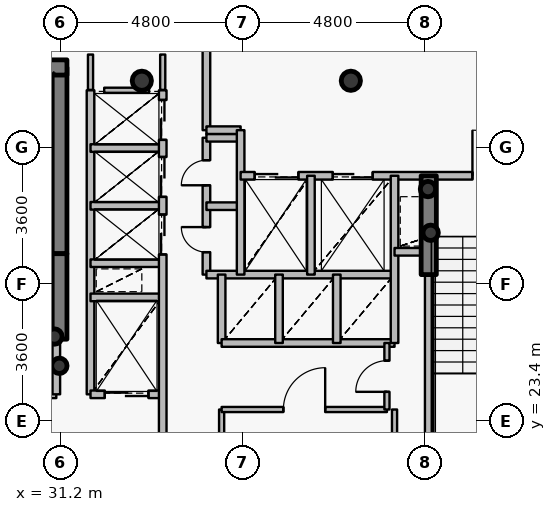
"""IFC4 building model, lengths in metres.
Left out: names, types, materials, properties, quantities, classifications, styles, units other than length and angle.
Written with IfcOpenShell. Run it as: python <this file> out.ifc"""

import sys

from ifc_helpers import new_model, si_unit, direction, frame, frame_2d, origin, origin_2d, place, context, subcontext, project, spatial, rectangle, hollow_circle, extrude, source, transform, mapped, element, fill, save


model = new_model("IFC4")
c1 = context("Model", 3, precision=1e-05, world=origin(), true_north=direction((0.0, 1.0)))
c2 = subcontext(c1, "Body", "Model", "MODEL_VIEW")
j1 = project(units=[si_unit("LENGTHUNIT", "METRE"), si_unit("PLANEANGLEUNIT", "RADIAN")], contexts=[c1])
p1 = place(None, origin())
s1 = spatial("IfcSite", under=j1, at=p1, CompositionType="ELEMENT")
p2 = place(p1, origin())
s2 = spatial("IfcBuilding", under=s1, at=p2, CompositionType="ELEMENT")
p3 = place(p2, frame((0.0, 0.0, 255.3)))
s3 = spatial("IfcBuildingStorey", under=s2, at=p3, CompositionType="ELEMENT", Elevation=255.3)
for number, where, z_axis, x_axis in (
    (1, (38.85, 32.35, 0.0), (0.0, 0.0, 1.0), (1.0, 0.0, 0.0)),
    (2, (33.35, 32.35, 0.0), (0.0, 0.0, 1.0), (1.0, 0.0, 0.0)),
):
    element("IfcColumn", number, at=place(p3, frame(where, z_axis=z_axis, x_axis=x_axis)), inside=s3, PredefinedType="COLUMN", context=c2, shape_type="SweptSolid", body=[
        extrude(hollow_circle(Radius=0.254, WallThickness=0.02, at=origin_2d()), origin(), (0.0, 0.0, 1.0), 3.75),
    ])
p4 = place(p3, frame((31.18, 27.8, 0.0), z_axis=(0.0, 0.0, 1.0), x_axis=(0.0, 1.0, 0.0)))
e3 = element("IfcWall", 3, at=p4, inside=s3, PredefinedType="SHEAR", context=c2, shape_type="SweptSolid", body=[
    extrude(rectangle(XDim=4.9, YDim=0.4, at=frame_2d((2.45, 0.0))), origin(), (0.0, 0.0, 1.0), 3.75),
])
p5 = place(p3, frame((27.28, 32.7, 0.0), z_axis=(0.0, 0.0, 1.0), x_axis=(1.0, 0.0, 0.0)))
e4 = element("IfcWall", 4, at=p5, inside=s3, PredefinedType="SHEAR", context=c2, shape_type="SweptSolid", body=[
    extrude(rectangle(XDim=4.1, YDim=0.4, at=frame_2d((2.05, 0.0))), origin(), (0.0, 0.0, 1.0), 3.75),
])
for number, where, z_axis, x_axis in (
    (5, (31.05, 25.62, 0.0), (0.0, 0.0, 1.0), (1.0, 0.0, 0.0)),
    (6, (31.18, 24.85, 0.0), (0.0, 0.0, 1.0), (1.0, 0.0, 0.0)),
    (7, (40.95, 28.35, 0.0), (0.0, 0.0, 1.0), (1.0, 0.0, 0.0)),
    (8, (40.88, 29.5, 0.0), (0.0, 0.0, 1.0), (1.0, 0.0, 0.0)),
):
    element("IfcColumn", number, at=place(p3, frame(where, z_axis=z_axis, x_axis=x_axis)), inside=s3, PredefinedType="COLUMN", context=c2, shape_type="SweptSolid", body=[
        extrude(hollow_circle(Radius=0.203, WallThickness=0.016, at=origin_2d()), origin(), (0.0, 0.0, 1.0), 3.75),
    ])
p6 = place(p3, frame((31.18, 25.55, 0.0), z_axis=(0.0, 0.0, 1.0), x_axis=(0.0, 1.0, 0.0)))
e9 = element("IfcWall", 9, at=p6, inside=s3, PredefinedType="SHEAR", context=c2, shape_type="SweptSolid", body=[
    extrude(rectangle(XDim=2.25, YDim=0.4, at=frame_2d((1.125, 0.0))), origin(), (0.0, 0.0, 1.0), 3.1),
])
p7 = place(p3, frame((40.9, 27.25, 0.0), z_axis=(0.0, 0.0, 1.0), x_axis=(0.0, 1.0, 0.0)))
e10 = element("IfcWall", 10, at=p7, inside=s3, PredefinedType="SHEAR", context=c2, shape_type="SweptSolid", body=[
    extrude(rectangle(XDim=2.6, YDim=0.4, at=frame_2d((1.3, 0.0))), origin(), (0.0, 0.0, 1.0), 3.1),
])
p8 = place(p3, frame((27.56, 24.1, 0.0), z_axis=(0.0, 0.0, 1.0), x_axis=(1.0, 0.0, 0.0)))
e11 = element("IfcWall", 11, at=p8, inside=s3, PredefinedType="PARTITIONING", context=c2, shape_type="SweptSolid", body=[
    extrude(rectangle(XDim=3.54, YDim=0.2, at=frame_2d((1.77, 0.0))), origin(), (0.0, 0.0, 1.0), 3.5),
])
p9 = place(p8, frame((1.17, 0.0, 0.0)))
e12 = element("IfcOpeningElement", 12, at=p9, cuts=e11, PredefinedType="OPENING", context=c2, shape_type="SweptSolid", body=[
    extrude(rectangle(XDim=1.2, YDim=2.15, at=origin_2d()), frame((0.6, 0.11, 1.075), z_axis=(0.0, -1.0, 0.0), x_axis=(1.0, 0.0, 0.0)), (0.0, 0.0, 1.0), 0.22),
])
p10 = place(p3, frame((31.1, 24.1, 0.0), z_axis=(0.0, 0.0, 1.0), x_axis=(0.0, 1.0, 0.0)))
e13 = element("IfcWall", 13, at=p10, inside=s3, PredefinedType="PARTITIONING", context=c2, shape_type="SweptSolid", body=[
    extrude(rectangle(XDim=1.44, YDim=0.2, at=frame_2d((0.72, 0.0))), origin(), (0.0, 0.0, 1.0), 3.5),
])
p11 = place(p3, frame((32.0, 24.1, 0.0), z_axis=(0.0, 0.0, 1.0), x_axis=(0.0, 1.0, 0.0)))
e14 = element("IfcWall", 14, at=p11, inside=s3, PredefinedType="PARTITIONING", context=c2, shape_type="SweptSolid", body=[
    extrude(rectangle(XDim=8.0, YDim=0.2, at=frame_2d((4.0, 0.0))), origin(), (0.0, 0.0, 1.0), 3.5),
])
p12 = place(p3, frame((32.0, 24.1, 0.0), z_axis=(0.0, 0.0, 1.0), x_axis=(1.0, 0.0, 0.0)))
e15 = element("IfcWall", 15, at=p12, inside=s3, PredefinedType="PARTITIONING", context=c2, shape_type="SweptSolid", body=[
    extrude(rectangle(XDim=1.9, YDim=0.2, at=frame_2d((0.95, 0.0))), origin(), (0.0, 0.0, 1.0), 3.085),
])
p13 = place(p12, frame((0.375, 0.0, 0.0)))
e16 = element("IfcOpeningElement", 16, at=p13, cuts=e15, PredefinedType="OPENING", context=c2, shape_type="SweptSolid", body=[
    extrude(rectangle(XDim=1.15, YDim=2.15, at=origin_2d()), frame((0.575, 0.11, 1.075), z_axis=(0.0, -1.0, 0.0), x_axis=(1.0, 0.0, 0.0)), (0.0, 0.0, 1.0), 0.22),
])
for number, where, z_axis, x_axis in (
    (17, (32.0, 26.65, 0.0), (0.0, 0.0, 1.0), (1.0, 0.0, 0.0)),
    (18, (32.0, 27.55, 0.0), (0.0, 0.0, 1.0), (1.0, 0.0, 0.0)),
    (19, (32.0, 29.06, 0.0), (0.0, 0.0, 1.0), (1.0, 0.0, 0.0)),
    (20, (32.0, 30.58, 0.0), (0.0, 0.0, 1.0), (1.0, 0.0, 0.0)),
):
    element("IfcWall", number, at=place(p3, frame(where, z_axis=z_axis, x_axis=x_axis)), inside=s3, PredefinedType="PARTITIONING", context=c2, shape_type="SweptSolid", body=[
        extrude(rectangle(XDim=1.9, YDim=0.2, at=frame_2d((0.95, 0.0))), origin(), (0.0, 0.0, 1.0), 3.085),
    ])
p14 = place(p3, frame((33.9, 20.7, 0.0), z_axis=(0.0, 0.0, 1.0), x_axis=(0.0, 1.0, 0.0)))
e21 = element("IfcWall", 21, at=p14, inside=s3, PredefinedType="PARTITIONING", context=c2, shape_type="SweptSolid", body=[
    extrude(rectangle(XDim=11.4, YDim=0.2, at=frame_2d((5.7, 0.0))), origin(), (0.0, 0.0, 1.0), 3.085),
])
p15 = place(p14, frame((7.08, 0.0, 0.0)))
e22 = element("IfcOpeningElement", 22, at=p15, cuts=e21, PredefinedType="OPENING", context=c2, shape_type="SweptSolid", body=[
    extrude(rectangle(XDim=1.05, YDim=2.15, at=origin_2d()), frame((0.525, 0.11, 1.075), z_axis=(0.0, -1.0, 0.0), x_axis=(1.0, 0.0, 0.0)), (0.0, 0.0, 1.0), 0.22),
])
p16 = place(p14, frame((8.595, 0.0, 0.0)))
e23 = element("IfcOpeningElement", 23, at=p16, cuts=e21, PredefinedType="OPENING", context=c2, shape_type="SweptSolid", body=[
    extrude(rectangle(XDim=1.05, YDim=2.15, at=origin_2d()), frame((0.525, 0.11, 1.075), z_axis=(0.0, -1.0, 0.0), x_axis=(1.0, 0.0, 0.0)), (0.0, 0.0, 1.0), 0.22),
])
p17 = place(p14, frame((10.095, 0.0, 0.0)))
e24 = element("IfcOpeningElement", 24, at=p17, cuts=e21, PredefinedType="OPENING", context=c2, shape_type="SweptSolid", body=[
    extrude(rectangle(XDim=1.05, YDim=2.15, at=origin_2d()), frame((0.525, 0.11, 1.075), z_axis=(0.0, -1.0, 0.0), x_axis=(1.0, 0.0, 0.0)), (0.0, 0.0, 1.0), 0.22),
])
p18 = place(p3, frame((35.05, 27.25, 0.0), z_axis=(0.0, 0.0, 1.0), x_axis=(0.0, 1.0, 0.0)))
e25 = element("IfcWall", 25, at=p18, inside=s3, PredefinedType="PARTITIONING", context=c2, shape_type="SweptSolid", body=[
    extrude(rectangle(XDim=3.6, YDim=0.2, at=frame_2d((1.8, 0.0))), origin(), (0.0, 0.0, 1.0), 3.5),
])
p19 = place(p18, frame((0.59, 0.0, 0.0)))
e26 = element("IfcOpeningElement", 26, at=p19, cuts=e25, PredefinedType="OPENING", context=c2, shape_type="SweptSolid", body=[
    extrude(rectangle(XDim=0.66, YDim=2.05, at=origin_2d()), frame((0.33, 0.11, 1.025), z_axis=(0.0, -1.0, 0.0), x_axis=(1.0, 0.0, 0.0)), (0.0, 0.0, 1.0), 0.22),
])
p20 = place(p18, frame((2.35, 0.0, 0.0)))
e27 = element("IfcOpeningElement", 27, at=p20, cuts=e25, PredefinedType="OPENING", context=c2, shape_type="SweptSolid", body=[
    extrude(rectangle(XDim=0.66, YDim=2.05, at=origin_2d()), frame((0.33, 0.11, 1.025), z_axis=(0.0, -1.0, 0.0), x_axis=(1.0, 0.0, 0.0)), (0.0, 0.0, 1.0), 0.22),
])
p21 = place(p3, frame((35.05, 27.25, 0.0), z_axis=(0.0, 0.0, 1.0), x_axis=(1.0, 0.0, 0.0)))
e28 = element("IfcWall", 28, at=p21, inside=s3, PredefinedType="PARTITIONING", context=c2, shape_type="SweptSolid", body=[
    extrude(rectangle(XDim=4.95, YDim=0.2, at=frame_2d((2.475, 0.0))), origin(), (0.0, 0.0, 1.0), 3.085),
])
for number, where, z_axis, x_axis in (
    (29, (35.05, 29.05, 0.0), (0.0, 0.0, 1.0), (1.0, 0.0, 0.0)),
    (30, (35.05, 30.85, 0.0), (0.0, 0.0, 1.0), (1.0, 0.0, 0.0)),
):
    element("IfcWall", number, at=place(p3, frame(where, z_axis=z_axis, x_axis=x_axis)), inside=s3, PredefinedType="PARTITIONING", context=c2, shape_type="SweptSolid", body=[
        extrude(rectangle(XDim=0.9, YDim=0.2, at=frame_2d((0.45, 0.0))), origin(), (0.0, 0.0, 1.0), 3.5),
    ])
p22 = place(p3, frame((35.05, 31.05, 0.0), z_axis=(0.0, 0.0, 1.0), x_axis=(0.0, 1.0, 0.0)))
e31 = element("IfcWall", 31, at=p22, inside=s3, PredefinedType="PARTITIONING", context=c2, shape_type="SweptSolid", body=[
    extrude(rectangle(XDim=2.25, YDim=0.2, at=frame_2d((1.125, 0.0))), origin(), (0.0, 0.0, 1.0), 3.085),
])
p23 = place(p3, frame((35.05, 31.05, 0.0), z_axis=(0.0, 0.0, 1.0), x_axis=(1.0, 0.0, 0.0)))
e32 = element("IfcWall", 32, at=p23, inside=s3, PredefinedType="PARTITIONING", context=c2, shape_type="SweptSolid", body=[
    extrude(rectangle(XDim=0.9, YDim=0.2, at=frame_2d((0.45, 0.0))), origin(), (0.0, 0.0, 1.0), 3.5),
])
p24 = place(p3, frame((35.45, 20.7, 0.0), z_axis=(0.0, 0.0, 1.0), x_axis=(0.0, 1.0, 0.0)))
e33 = element("IfcWall", 33, at=p24, inside=s3, PredefinedType="PARTITIONING", context=c2, shape_type="SweptSolid", body=[
    extrude(rectangle(XDim=3.0, YDim=0.135, at=frame_2d((1.5, 0.0))), origin(), (0.0, 0.0, 1.0), 3.085),
])
p25 = place(p3, frame((35.45, 23.7, 0.0), z_axis=(0.0, 0.0, 1.0), x_axis=(1.0, 0.0, 0.0)))
e34 = element("IfcWall", 34, at=p25, inside=s3, PredefinedType="PARTITIONING", context=c2, shape_type="SweptSolid", body=[
    extrude(rectangle(XDim=4.35, YDim=0.135, at=frame_2d((2.175, 0.0))), origin(), (0.0, 0.0, 1.0), 3.085),
])
p26 = place(p25, frame((1.625, 0.0, 0.0)))
e35 = element("IfcOpeningElement", 35, at=p26, cuts=e34, PredefinedType="OPENING", context=c2, shape_type="SweptSolid", body=[
    extrude(rectangle(XDim=1.1, YDim=2.15, at=origin_2d()), frame((0.55, 0.078, 1.075), z_axis=(0.0, -1.0, 0.0), x_axis=(1.0, 0.0, 0.0)), (0.0, 0.0, 1.0), 0.155),
])
p27 = place(p3, frame((35.45, 25.45, 0.0), z_axis=(0.0, 0.0, 1.0), x_axis=(0.0, 1.0, 0.0)))
e36 = element("IfcWall", 36, at=p27, inside=s3, PredefinedType="PARTITIONING", context=c2, shape_type="SweptSolid", body=[
    extrude(rectangle(XDim=1.8, YDim=0.2, at=frame_2d((0.9, 0.0))), origin(), (0.0, 0.0, 1.0), 3.5),
])
p28 = place(p3, frame((35.45, 25.45, 0.0), z_axis=(0.0, 0.0, 1.0), x_axis=(1.0, 0.0, 0.0)))
e37 = element("IfcWall", 37, at=p28, inside=s3, PredefinedType="PARTITIONING", context=c2, shape_type="SweptSolid", body=[
    extrude(rectangle(XDim=4.55, YDim=0.2, at=frame_2d((2.275, 0.0))), origin(), (0.0, 0.0, 1.0), 3.085),
])
p29 = place(p3, frame((35.95, 27.25, 0.0), z_axis=(0.0, 0.0, 1.0), x_axis=(0.0, 1.0, 0.0)))
e38 = element("IfcWall", 38, at=p29, inside=s3, PredefinedType="PARTITIONING", context=c2, shape_type="SweptSolid", body=[
    extrude(rectangle(XDim=3.8, YDim=0.2, at=frame_2d((1.9, 0.0))), origin(), (0.0, 0.0, 1.0), 3.5),
])
p30 = place(p3, frame((35.95, 29.85, 0.0), z_axis=(0.0, 0.0, 1.0), x_axis=(1.0, 0.0, 0.0)))
e39 = element("IfcWall", 39, at=p30, inside=s3, PredefinedType="PARTITIONING", context=c2, shape_type="SweptSolid", body=[
    extrude(rectangle(XDim=8.49, YDim=0.2, at=frame_2d((4.245, 0.0))), origin(), (0.0, 0.0, 1.0), 3.085),
])
p31 = place(p30, frame((6.1, 0.0, 0.0)))
e40 = element("IfcOpeningElement", 40, at=p31, cuts=e39, PredefinedType="OPENING", context=c2, shape_type="SweptSolid", body=[
    extrude(rectangle(XDim=1.2, YDim=2.15, at=origin_2d()), frame((0.6, 0.11, 1.075), z_axis=(0.0, -1.0, 0.0), x_axis=(1.0, 0.0, 0.0)), (0.0, 0.0, 1.0), 0.22),
])
p32 = place(p30, frame((0.37, 0.0, 0.0)))
e41 = element("IfcOpeningElement", 41, at=p32, cuts=e39, PredefinedType="OPENING", context=c2, shape_type="SweptSolid", body=[
    extrude(rectangle(XDim=1.15, YDim=2.15, at=origin_2d()), frame((0.575, 0.11, 1.075), z_axis=(0.0, -1.0, 0.0), x_axis=(1.0, 0.0, 0.0)), (0.0, 0.0, 1.0), 0.22),
])
p33 = place(p30, frame((2.425, 0.0, 0.0)))
e42 = element("IfcOpeningElement", 42, at=p33, cuts=e39, PredefinedType="OPENING", context=c2, shape_type="SweptSolid", body=[
    extrude(rectangle(XDim=1.05, YDim=2.15, at=origin_2d()), frame((0.525, 0.11, 1.075), z_axis=(0.0, -1.0, 0.0), x_axis=(1.0, 0.0, 0.0)), (0.0, 0.0, 1.0), 0.22),
])
p34 = place(p3, frame((36.96, 25.45, 0.0), z_axis=(0.0, 0.0, 1.0), x_axis=(0.0, 1.0, 0.0)))
e43 = element("IfcWall", 43, at=p34, inside=s3, PredefinedType="PARTITIONING", context=c2, shape_type="SweptSolid", body=[
    extrude(rectangle(XDim=1.8, YDim=0.2, at=frame_2d((0.9, 0.0))), origin(), (0.0, 0.0, 1.0), 3.5),
])
p35 = place(p3, frame((37.8, 27.25, 0.0), z_axis=(0.0, 0.0, 1.0), x_axis=(0.0, 1.0, 0.0)))
e44 = element("IfcWall", 44, at=p35, inside=s3, PredefinedType="PARTITIONING", context=c2, shape_type="SweptSolid", body=[
    extrude(rectangle(XDim=2.6, YDim=0.2, at=frame_2d((1.3, 0.0))), origin(), (0.0, 0.0, 1.0), 3.5),
])
p36 = place(p3, frame((38.48, 25.45, 0.0), z_axis=(0.0, 0.0, 1.0), x_axis=(0.0, 1.0, 0.0)))
e45 = element("IfcWall", 45, at=p36, inside=s3, PredefinedType="PARTITIONING", context=c2, shape_type="SweptSolid", body=[
    extrude(rectangle(XDim=1.8, YDim=0.2, at=frame_2d((0.9, 0.0))), origin(), (0.0, 0.0, 1.0), 3.5),
])
p37 = place(p3, frame((39.8, 23.7, 0.0), z_axis=(0.0, 0.0, 1.0), x_axis=(0.0, 1.0, 0.0)))
e46 = element("IfcWall", 46, at=p37, inside=s3, PredefinedType="PARTITIONING", context=c2, shape_type="SweptSolid", body=[
    extrude(rectangle(XDim=1.75, YDim=0.135, at=frame_2d((0.875, 0.0))), origin(), (0.0, 0.0, 1.0), 3.5),
])
p38 = place(p37, frame((0.465, 0.0, 0.0)))
e47 = element("IfcOpeningElement", 47, at=p38, cuts=e46, PredefinedType="OPENING", context=c2, shape_type="SweptSolid", body=[
    extrude(rectangle(XDim=0.82, YDim=2.1, at=origin_2d()), frame((0.41, 0.078, 1.05), z_axis=(0.0, -1.0, 0.0), x_axis=(1.0, 0.0, 0.0)), (0.0, 0.0, 1.0), 0.155),
])
p39 = place(p3, frame((40.0, 25.45, 0.0), z_axis=(0.0, 0.0, 1.0), x_axis=(0.0, 1.0, 0.0)))
e48 = element("IfcWall", 48, at=p39, inside=s3, PredefinedType="PARTITIONING", context=c2, shape_type="SweptSolid", body=[
    extrude(rectangle(XDim=4.4, YDim=0.2, at=frame_2d((2.2, 0.0))), origin(), (0.0, 0.0, 1.0), 3.5),
])
p40 = place(p3, frame((40.0, 27.85, 0.0), z_axis=(0.0, 0.0, 1.0), x_axis=(1.0, 0.0, 0.0)))
e49 = element("IfcWall", 49, at=p40, inside=s3, PredefinedType="PARTITIONING", context=c2, shape_type="SweptSolid", body=[
    extrude(rectangle(XDim=0.9, YDim=0.2, at=frame_2d((0.45, 0.0))), origin(), (0.0, 0.0, 1.0), 3.5),
])
p41 = place(p3, frame((40.9, 21.33, 0.0), z_axis=(0.0, 0.0, 1.0), x_axis=(0.0, 1.0, 0.0)))
e50 = element("IfcWall", 50, at=p41, inside=s3, PredefinedType="PARTITIONING", context=c2, shape_type="SweptSolid", body=[
    extrude(rectangle(XDim=5.91, YDim=0.2, at=frame_2d((2.955, 0.0))), origin(), (0.0, 0.0, 1.0), 3.035),
])
p42 = place(p3, frame((32.36, 32.1, 0.0), z_axis=(0.0, 0.0, 1.0), x_axis=(1.0, 0.0, 0.0)))
e51 = element("IfcWall", 51, at=p42, inside=s3, PredefinedType="PARTITIONING", context=c2, shape_type="SweptSolid", body=[
    extrude(rectangle(XDim=1.18, YDim=0.135, at=frame_2d((0.59, 0.0))), origin(), (0.0, 0.0, 1.0), 3.085),
])
p43 = place(p3, frame((40.0, 23.7, 0.0), z_axis=(0.0, 0.0, 1.0), x_axis=(0.0, -1.0, 0.0)))
e52 = element("IfcWall", 52, at=p43, inside=s3, PredefinedType="PARTITIONING", context=c2, shape_type="SweptSolid", body=[
    extrude(rectangle(XDim=2.74, YDim=0.135, at=frame_2d((1.37, 0.0))), origin(), (0.0, 0.0, 1.0), 3.035),
])
p44 = place(p3, frame((32.0, 33.04, 0.0), z_axis=(0.0, 0.0, 1.0), x_axis=(0.0, -1.0, 0.0)))
e53 = element("IfcWall", 53, at=p44, inside=s3, PredefinedType="PARTITIONING", context=c2, shape_type="SweptSolid", body=[
    extrude(rectangle(XDim=0.93, YDim=0.135, at=frame_2d((0.465, 0.0))), origin(), (0.0, 0.0, 1.0), 3.035),
])
p45 = place(p3, frame((33.9, 32.11, 0.0), z_axis=(0.0, 0.0, 1.0), x_axis=(0.0, 1.0, 0.0)))
e54 = element("IfcWall", 54, at=p45, inside=s3, PredefinedType="PARTITIONING", context=c2, shape_type="SweptSolid", body=[
    extrude(rectangle(XDim=0.93, YDim=0.135, at=frame_2d((0.465, 0.0))), origin(), (0.0, 0.0, 1.0), 3.085),
])
m1 = source(origin(), c2, "Body", "SweptSolid", [
    extrude(rectangle(XDim=1.2, YDim=2.15, at=origin_2d()), frame((0.6, 0.025, 1.075), z_axis=(0.0, -1.0, 0.0), x_axis=(1.0, 0.0, 0.0)), (0.0, 0.0, 1.0), 0.05),
])
p46 = place(p31, origin())
e55 = element("IfcDoor", 55, at=p46, inside=s3, OperationType="SINGLE_SWING_LEFT", PredefinedType="DOOR", context=c2, shape_type="MappedRepresentation", body=[
    mapped(m1, transform((0.0, 0.0, 0.0), x_axis=(1.0, 0.0, 0.0), y_axis=(0.0, 1.0, 0.0), z_axis=(0.0, 0.0, 1.0), scale=1.0)),
])
fill(e40, e55)
m2 = source(origin(), c2, "Body", "SweptSolid", [
    extrude(rectangle(XDim=1.15, YDim=2.15, at=origin_2d()), frame((0.575, 0.025, 1.075), z_axis=(0.0, -1.0, 0.0), x_axis=(1.0, 0.0, 0.0)), (0.0, 0.0, 1.0), 0.05),
])
p47 = place(p32, origin())
e56 = element("IfcDoor", 56, at=p47, inside=s3, OperationType="DOUBLE_DOOR_SLIDING", PredefinedType="USERDEFINED", context=c2, shape_type="MappedRepresentation", body=[
    mapped(m2, transform((0.0, 0.0, 0.0), x_axis=(1.0, 0.0, 0.0), y_axis=(0.0, 1.0, 0.0), z_axis=(0.0, 0.0, 1.0), scale=1.0)),
])
fill(e41, e56)
p48 = place(p13, origin())
e57 = element("IfcDoor", 57, at=p48, inside=s3, OperationType="DOUBLE_DOOR_SLIDING", PredefinedType="USERDEFINED", context=c2, shape_type="MappedRepresentation", body=[
    mapped(m2, transform((0.0, 0.0, 0.0), x_axis=(1.0, 0.0, 0.0), y_axis=(0.0, 1.0, 0.0), z_axis=(0.0, 0.0, 1.0), scale=1.0)),
])
fill(e16, e57)
m3 = source(origin(), c2, "Body", "SweptSolid", [
    extrude(rectangle(XDim=1.05, YDim=2.15, at=origin_2d()), frame((0.525, 0.025, 1.075), z_axis=(0.0, -1.0, 0.0), x_axis=(1.0, 0.0, 0.0)), (0.0, 0.0, 1.0), 0.05),
])
p49 = place(p33, origin())
e58 = element("IfcDoor", 58, at=p49, inside=s3, OperationType="DOUBLE_DOOR_SLIDING", PredefinedType="USERDEFINED", context=c2, shape_type="MappedRepresentation", body=[
    mapped(m3, transform((0.0, 0.0, 0.0), x_axis=(1.0, 0.0, 0.0), y_axis=(0.0, 1.0, 0.0), z_axis=(0.0, 0.0, 1.0), scale=1.0)),
])
fill(e42, e58)
p50 = place(p15, origin())
e59 = element("IfcDoor", 59, at=p50, inside=s3, OperationType="DOUBLE_DOOR_SLIDING", PredefinedType="USERDEFINED", context=c2, shape_type="MappedRepresentation", body=[
    mapped(m3, transform((0.0, 0.0, 0.0), x_axis=(1.0, 0.0, 0.0), y_axis=(0.0, 1.0, 0.0), z_axis=(0.0, 0.0, 1.0), scale=1.0)),
])
fill(e22, e59)
p51 = place(p16, origin())
e60 = element("IfcDoor", 60, at=p51, inside=s3, OperationType="DOUBLE_DOOR_SLIDING", PredefinedType="USERDEFINED", context=c2, shape_type="MappedRepresentation", body=[
    mapped(m3, transform((0.0, 0.0, 0.0), x_axis=(1.0, 0.0, 0.0), y_axis=(0.0, 1.0, 0.0), z_axis=(0.0, 0.0, 1.0), scale=1.0)),
])
fill(e23, e60)
p52 = place(p17, origin())
e61 = element("IfcDoor", 61, at=p52, inside=s3, OperationType="DOUBLE_DOOR_SLIDING", PredefinedType="USERDEFINED", context=c2, shape_type="MappedRepresentation", body=[
    mapped(m3, transform((0.0, 0.0, 0.0), x_axis=(1.0, 0.0, 0.0), y_axis=(0.0, 1.0, 0.0), z_axis=(0.0, 0.0, 1.0), scale=1.0)),
])
fill(e24, e61)
m4 = source(origin(), c2, "Body", "SweptSolid", [
    extrude(rectangle(XDim=0.66, YDim=2.05, at=origin_2d()), frame((0.33, 0.025, 1.025), z_axis=(0.0, -1.0, 0.0), x_axis=(1.0, 0.0, 0.0)), (0.0, 0.0, 1.0), 0.05),
])
p53 = place(p19, origin())
e62 = element("IfcDoor", 62, at=p53, inside=s3, OperationType="SINGLE_SWING_RIGHT", PredefinedType="USERDEFINED", context=c2, shape_type="MappedRepresentation", body=[
    mapped(m4, transform((0.0, 0.0, 0.0), x_axis=(1.0, 0.0, 0.0), y_axis=(0.0, 1.0, 0.0), z_axis=(0.0, 0.0, 1.0), scale=1.0)),
])
fill(e26, e62)
p54 = place(p20, origin())
e63 = element("IfcDoor", 63, at=p54, inside=s3, OperationType="SINGLE_SWING_LEFT", PredefinedType="USERDEFINED", context=c2, shape_type="MappedRepresentation", body=[
    mapped(m4, transform((0.0, 0.0, 0.0), x_axis=(1.0, 0.0, 0.0), y_axis=(0.0, 1.0, 0.0), z_axis=(0.0, 0.0, 1.0), scale=1.0)),
])
fill(e27, e63)
m5 = source(origin(), c2, "Body", "SweptSolid", [
    extrude(rectangle(XDim=1.1, YDim=2.15, at=origin_2d()), frame((0.55, 0.025, 1.075), z_axis=(0.0, -1.0, 0.0), x_axis=(1.0, 0.0, 0.0)), (0.0, 0.0, 1.0), 0.05),
])
p55 = place(p26, origin())
e64 = element("IfcDoor", 64, at=p55, inside=s3, OperationType="SINGLE_SWING_RIGHT", PredefinedType="DOOR", context=c2, shape_type="MappedRepresentation", body=[
    mapped(m5, transform((0.0, 0.0, 0.0), x_axis=(1.0, 0.0, 0.0), y_axis=(0.0, 1.0, 0.0), z_axis=(0.0, 0.0, 1.0), scale=1.0)),
])
fill(e35, e64)
m6 = source(origin(), c2, "Body", "SweptSolid", [
    extrude(rectangle(XDim=0.82, YDim=2.1, at=origin_2d()), frame((0.41, 0.025, 1.05), z_axis=(0.0, -1.0, 0.0), x_axis=(1.0, 0.0, 0.0)), (0.0, 0.0, 1.0), 0.05),
])
p56 = place(p38, origin())
e65 = element("IfcDoor", 65, at=p56, inside=s3, OperationType="SINGLE_SWING_LEFT", PredefinedType="DOOR", context=c2, shape_type="MappedRepresentation", body=[
    mapped(m6, transform((0.0, 0.0, 0.0), x_axis=(1.0, 0.0, 0.0), y_axis=(0.0, 1.0, 0.0), z_axis=(0.0, 0.0, 1.0), scale=1.0)),
])
fill(e47, e65)
save(model, sys.argv[1])
